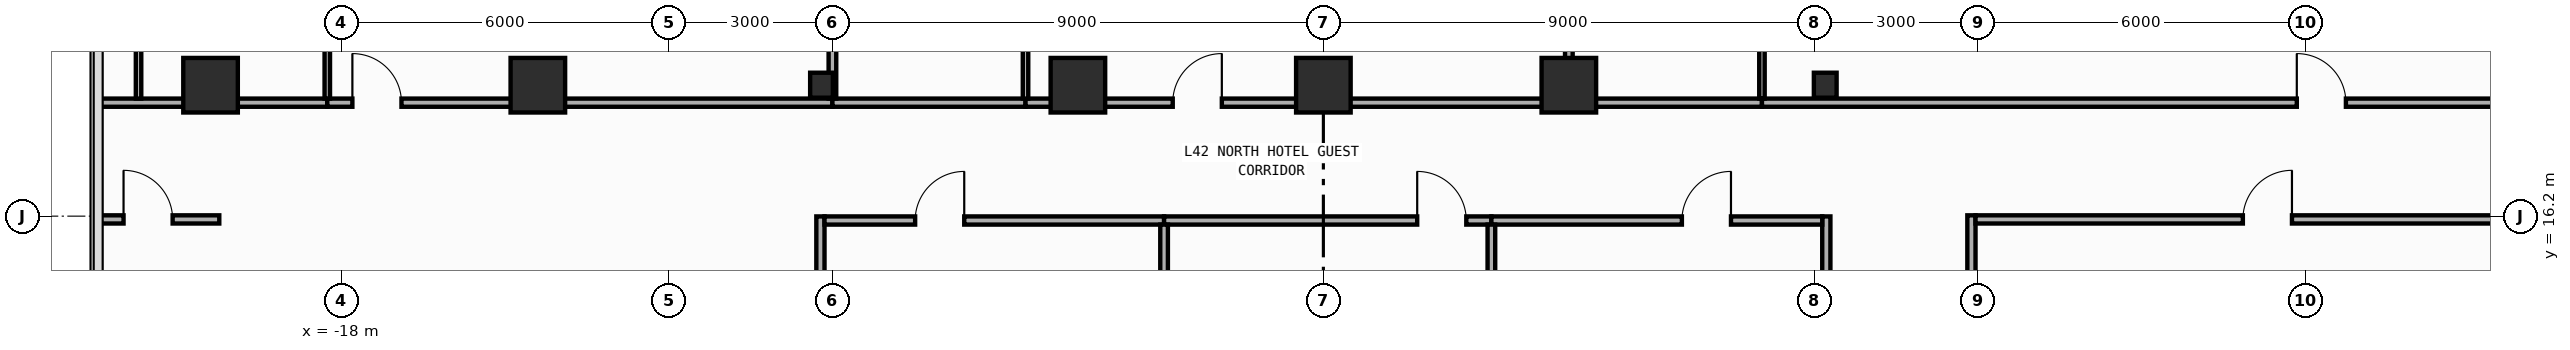
"""IFC4 building model, lengths in metres.
Left out: names, types, materials, properties, quantities, classifications, styles, units other than length and angle.
Written with IfcOpenShell. Run it as: python <this file> out.ifc"""

import sys

from ifc_helpers import new_model, si_unit, direction, frame, frame_2d, origin, origin_2d, place, context, subcontext, project, spatial, rectangle, i_section, extrude, element, fill, save


model = new_model("IFC4")
c1 = context("Model", 3, precision=1e-05, world=origin(), true_north=direction((0.0, 1.0)))
c2 = subcontext(c1, "Body", "Model", "MODEL_VIEW")
j1 = project(units=[si_unit("LENGTHUNIT", "METRE"), si_unit("PLANEANGLEUNIT", "RADIAN")], contexts=[c1])
p1 = place(None, origin())
s1 = spatial("IfcSite", under=j1, at=p1, CompositionType="ELEMENT")
p2 = place(p1, origin())
s2 = spatial("IfcBuilding", under=s1, at=p2, CompositionType="ELEMENT")
p3 = place(p2, frame((0.0, 0.0, 184.0)))
s3 = spatial("IfcBuildingStorey", under=s2, at=p3, CompositionType="ELEMENT", Elevation=184.0)
for number, where, z_axis, x_axis in (
    (1, (-9.2, 18.6, 0.0), (0.0, 0.0, 1.0), (1.0, 0.0, 0.0)),
    (2, (9.2, 18.6, 0.0), (0.0, 0.0, 1.0), (1.0, 0.0, 0.0)),
):
    element("IfcColumn", number, at=place(p3, frame(where, z_axis=z_axis, x_axis=x_axis)), inside=s3, PredefinedType="COLUMN", context=c2, shape_type="SweptSolid", body=[
        extrude(i_section(OverallWidth=0.417, OverallDepth=0.458, WebThickness=0.03, FlangeThickness=0.05, FilletRadius=0.022, at=origin_2d()), origin(), (0.0, 0.0, 1.0), 3.8),
    ])
for number, where, z_axis, x_axis in (
    (3, (-20.4, 18.6, 0.0), (0.0, 0.0, 1.0), (1.0, 0.0, 0.0)),
    (4, (-14.4, 18.6, 0.0), (0.0, 0.0, 1.0), (1.0, 0.0, 0.0)),
    (5, (-4.5, 18.6, 0.0), (0.0, 0.0, 1.0), (1.0, 0.0, 0.0)),
    (6, (0.0, 18.6, 0.0), (0.0, 0.0, 1.0), (1.0, 0.0, 0.0)),
    (7, (4.5, 18.6, 0.0), (0.0, 0.0, 1.0), (1.0, 0.0, 0.0)),
):
    element("IfcColumn", number, at=place(p3, frame(where, z_axis=z_axis, x_axis=x_axis)), inside=s3, PredefinedType="COLUMN", context=c2, shape_type="SweptSolid", body=[
        extrude(rectangle(XDim=1.0, YDim=1.0, at=origin_2d()), origin(), (0.0, 0.0, 1.0), 3.8),
    ])
p4 = place(p3, frame((-9.22, -5.8, 0.0), z_axis=(0.0, 0.0, 1.0), x_axis=(0.0, 1.0, 0.0)))
e8 = element("IfcWall", 8, at=p4, inside=s3, PredefinedType="PARTITIONING", context=c2, shape_type="SweptSolid", body=[
    extrude(rectangle(XDim=21.995, YDim=0.15, at=frame_2d((10.998, 0.0))), origin(), (0.0, 0.0, 1.0), 2.952),
])
p5 = place(p4, frame((10.749, 0.0, 0.0)))
e9 = element("IfcOpeningElement", 9, at=p5, cuts=e8, PredefinedType="OPENING", context=c2, shape_type="SweptSolid", body=[
    extrude(rectangle(XDim=0.9, YDim=2.15, at=frame_2d((0.45, 1.075))), frame((0.0, 0.085, 0.0), z_axis=(0.0, -1.0, 0.0), x_axis=(1.0, 0.0, 0.0)), (0.0, 0.0, 1.0), 0.17),
])
p6 = place(p3, frame((9.22, -5.8, 0.0), z_axis=(0.0, 0.0, 1.0), x_axis=(0.0, 1.0, 0.0)))
e10 = element("IfcWall", 10, at=p6, inside=s3, PredefinedType="PARTITIONING", context=c2, shape_type="SweptSolid", body=[
    extrude(rectangle(XDim=21.995, YDim=0.15, at=frame_2d((10.998, 0.0))), origin(), (0.0, 0.0, 1.0), 2.952),
])
p7 = place(p6, frame((10.749, 0.0, 0.0)))
e11 = element("IfcOpeningElement", 11, at=p7, cuts=e10, PredefinedType="OPENING", context=c2, shape_type="SweptSolid", body=[
    extrude(rectangle(XDim=0.9, YDim=2.15, at=frame_2d((0.45, 1.075))), frame((0.0, 0.085, 0.0), z_axis=(0.0, -1.0, 0.0), x_axis=(1.0, 0.0, 0.0)), (0.0, 0.0, 1.0), 0.17),
])
p8 = place(p3, frame((11.88, 7.16, 0.0), z_axis=(0.0, 0.0, 1.0), x_axis=(0.0, 1.0, 0.0)))
e12 = element("IfcWall", 12, at=p8, inside=s3, PredefinedType="PARTITIONING", context=c2, shape_type="SweptSolid", body=[
    extrude(rectangle(XDim=9.055, YDim=0.15, at=frame_2d((4.528, 0.0))), origin(), (0.0, 0.0, 1.0), 3.54),
])
p9 = place(p8, frame((0.46, 0.0, 0.0)))
e13 = element("IfcOpeningElement", 13, at=p9, cuts=e12, PredefinedType="OPENING", context=c2, shape_type="SweptSolid", body=[
    extrude(rectangle(XDim=0.9, YDim=2.15, at=frame_2d((0.45, 1.075))), frame((0.0, 0.085, 0.0), z_axis=(0.0, -1.0, 0.0), x_axis=(1.0, 0.0, 0.0)), (0.0, 0.0, 1.0), 0.17),
])
p10 = place(p3, frame((-9.145, 16.12, 0.0), z_axis=(0.0, 0.0, 1.0), x_axis=(1.0, 0.0, 0.0)))
e14 = element("IfcWall", 14, at=p10, inside=s3, PredefinedType="PARTITIONING", context=c2, shape_type="SweptSolid", body=[
    extrude(rectangle(XDim=6.225, YDim=0.15, at=frame_2d((3.113, 0.0))), origin(), (0.0, 0.0, 1.0), 3.54),
])
p11 = place(p10, frame((1.661, 0.0, 0.0)))
e15 = element("IfcOpeningElement", 15, at=p11, cuts=e14, PredefinedType="OPENING", context=c2, shape_type="SweptSolid", body=[
    extrude(rectangle(XDim=0.9, YDim=2.15, at=frame_2d((0.45, 1.075))), frame((0.0, 0.085, 0.0), z_axis=(0.0, -1.0, 0.0), x_axis=(1.0, 0.0, 0.0)), (0.0, 0.0, 1.0), 0.17),
])
p12 = place(p3, frame((-2.92, 16.12, 0.0), z_axis=(0.0, 0.0, 1.0), x_axis=(1.0, 0.0, 0.0)))
e16 = element("IfcWall", 16, at=p12, inside=s3, PredefinedType="PARTITIONING", context=c2, shape_type="SweptSolid", body=[
    extrude(rectangle(XDim=6.0, YDim=0.15, at=frame_2d((3.0, 0.0))), origin(), (0.0, 0.0, 1.0), 3.54),
])
p13 = place(p12, frame((4.64, 0.0, 0.0)))
e17 = element("IfcOpeningElement", 17, at=p13, cuts=e16, PredefinedType="OPENING", context=c2, shape_type="SweptSolid", body=[
    extrude(rectangle(XDim=0.9, YDim=2.15, at=frame_2d((0.45, 1.075))), frame((0.0, 0.085, 0.0), z_axis=(0.0, -1.0, 0.0), x_axis=(1.0, 0.0, 0.0)), (0.0, 0.0, 1.0), 0.17),
])
p14 = place(p3, frame((3.08, 16.12, 0.0), z_axis=(0.0, 0.0, 1.0), x_axis=(1.0, 0.0, 0.0)))
e18 = element("IfcWall", 18, at=p14, inside=s3, PredefinedType="PARTITIONING", context=c2, shape_type="SweptSolid", body=[
    extrude(rectangle(XDim=6.065, YDim=0.15, at=frame_2d((3.032, 0.0))), origin(), (0.0, 0.0, 1.0), 3.54),
])
p15 = place(p14, frame((3.492, 0.0, 0.0)))
e19 = element("IfcOpeningElement", 19, at=p15, cuts=e18, PredefinedType="OPENING", context=c2, shape_type="SweptSolid", body=[
    extrude(rectangle(XDim=0.9, YDim=2.15, at=frame_2d((0.45, 1.075))), frame((0.0, 0.085, 0.0), z_axis=(0.0, -1.0, 0.0), x_axis=(1.0, 0.0, 0.0)), (0.0, 0.0, 1.0), 0.17),
])
p16 = place(p3, frame((-22.455, 18.28, 0.0), z_axis=(0.0, 0.0, 1.0), x_axis=(1.0, 0.0, 0.0)))
e20 = element("IfcWall", 20, at=p16, inside=s3, PredefinedType="PARTITIONING", context=c2, shape_type="SweptSolid", body=[
    extrude(rectangle(XDim=4.195, YDim=0.15, at=frame_2d((2.098, 0.0))), origin(), (0.0, 0.0, 1.0), 2.952),
])
p17 = place(p3, frame((-18.26, 18.28, 0.0), z_axis=(0.0, 0.0, 1.0), x_axis=(1.0, 0.0, 0.0)))
e21 = element("IfcWall", 21, at=p17, inside=s3, PredefinedType="PARTITIONING", context=c2, shape_type="SweptSolid", body=[
    extrude(rectangle(XDim=9.26, YDim=0.15, at=frame_2d((4.63, 0.0))), origin(), (0.0, 0.0, 1.0), 2.952),
])
p18 = place(p17, frame((0.46, 0.0, 0.0)))
e22 = element("IfcOpeningElement", 22, at=p18, cuts=e21, PredefinedType="OPENING", context=c2, shape_type="SweptSolid", body=[
    extrude(rectangle(XDim=0.9, YDim=2.15, at=frame_2d((0.45, 1.075))), frame((0.0, 0.085, 0.0), z_axis=(0.0, -1.0, 0.0), x_axis=(1.0, 0.0, 0.0)), (0.0, 0.0, 1.0), 0.17),
])
p19 = place(p3, frame((-9.0, 18.28, 0.0), z_axis=(0.0, 0.0, 1.0), x_axis=(1.0, 0.0, 0.0)))
e23 = element("IfcWall", 23, at=p19, inside=s3, PredefinedType="PARTITIONING", context=c2, shape_type="SweptSolid", body=[
    extrude(rectangle(XDim=3.54, YDim=0.15, at=frame_2d((1.77, 0.0))), origin(), (0.0, 0.0, 1.0), 2.952),
])
p20 = place(p3, frame((-5.46, 18.28, 0.0), z_axis=(0.0, 0.0, 1.0), x_axis=(1.0, 0.0, 0.0)))
e24 = element("IfcWall", 24, at=p20, inside=s3, PredefinedType="PARTITIONING", context=c2, shape_type="SweptSolid", body=[
    extrude(rectangle(XDim=9.96, YDim=0.15, at=frame_2d((4.98, 0.0))), origin(), (0.0, 0.0, 1.0), 2.952),
])
p21 = place(p20, frame((2.698, 0.0, 0.0)))
e25 = element("IfcOpeningElement", 25, at=p21, cuts=e24, PredefinedType="OPENING", context=c2, shape_type="SweptSolid", body=[
    extrude(rectangle(XDim=0.9, YDim=2.15, at=frame_2d((0.45, 1.075))), frame((0.0, 0.085, 0.0), z_axis=(0.0, -1.0, 0.0), x_axis=(1.0, 0.0, 0.0)), (0.0, 0.0, 1.0), 0.17),
])
p22 = place(p3, frame((4.5, 18.28, 0.0), z_axis=(0.0, 0.0, 1.0), x_axis=(1.0, 0.0, 0.0)))
e26 = element("IfcWall", 26, at=p22, inside=s3, PredefinedType="PARTITIONING", context=c2, shape_type="SweptSolid", body=[
    extrude(rectangle(XDim=3.54, YDim=0.15, at=frame_2d((1.77, 0.0))), origin(), (0.0, 0.0, 1.0), 2.952),
])
p23 = place(p3, frame((8.04, 18.28, 0.0), z_axis=(0.0, 0.0, 1.0), x_axis=(1.0, 0.0, 0.0)))
e27 = element("IfcWall", 27, at=p23, inside=s3, PredefinedType="PARTITIONING", context=c2, shape_type="SweptSolid", body=[
    extrude(rectangle(XDim=14.415, YDim=0.15, at=frame_2d((7.208, 0.0))), origin(), (0.0, 0.0, 1.0), 2.952),
])
p24 = place(p23, frame((9.805, 0.0, 0.0)))
e28 = element("IfcOpeningElement", 28, at=p24, cuts=e27, PredefinedType="OPENING", context=c2, shape_type="SweptSolid", body=[
    extrude(rectangle(XDim=0.9, YDim=2.15, at=frame_2d((0.45, 1.075))), frame((0.0, 0.085, 0.0), z_axis=(0.0, -1.0, 0.0), x_axis=(1.0, 0.0, 0.0)), (0.0, 0.0, 1.0), 0.17),
])
p25 = place(p3, frame((11.955, 16.14, 0.0), z_axis=(0.0, 0.0, 1.0), x_axis=(1.0, 0.0, 0.0)))
e29 = element("IfcWall", 29, at=p25, inside=s3, PredefinedType="PARTITIONING", context=c2, shape_type="SweptSolid", body=[
    extrude(rectangle(XDim=10.5, YDim=0.15, at=frame_2d((5.25, 0.0))), origin(), (0.0, 0.0, 1.0), 3.54),
])
p26 = place(p25, frame((4.901, 0.0, 0.0)))
e30 = element("IfcOpeningElement", 30, at=p26, cuts=e29, PredefinedType="OPENING", context=c2, shape_type="SweptSolid", body=[
    extrude(rectangle(XDim=0.9, YDim=2.15, at=frame_2d((0.45, 1.075))), frame((0.0, 0.085, 0.0), z_axis=(0.0, -1.0, 0.0), x_axis=(1.0, 0.0, 0.0)), (0.0, 0.0, 1.0), 0.17),
])
p27 = place(p3, frame((-22.455, 16.14, 0.0), z_axis=(0.0, 0.0, 1.0), x_axis=(1.0, 0.0, 0.0)))
e31 = element("IfcWall", 31, at=p27, inside=s3, PredefinedType="PARTITIONING", context=c2, shape_type="SweptSolid", body=[
    extrude(rectangle(XDim=2.215, YDim=0.15, at=frame_2d((1.107, 0.0))), origin(), (0.0, 0.0, 1.0), 3.54),
])
p28 = place(p27, frame((0.46, 0.0, 0.0)))
e32 = element("IfcOpeningElement", 32, at=p28, cuts=e31, PredefinedType="OPENING", context=c2, shape_type="SweptSolid", body=[
    extrude(rectangle(XDim=0.9, YDim=2.15, at=frame_2d((0.45, 1.075))), frame((0.0, 0.085, 0.0), z_axis=(0.0, -1.0, 0.0), x_axis=(1.0, 0.0, 0.0)), (0.0, 0.0, 1.0), 0.17),
])
for number, where, z_axis, x_axis in (
    (33, (-2.92, -5.73, 0.0), (0.0, 0.0, 1.0), (0.0, 1.0, 0.0)),
    (34, (3.08, -5.73, 0.0), (0.0, 0.0, 1.0), (0.0, 1.0, 0.0)),
):
    element("IfcWall", number, at=place(p3, frame(where, z_axis=z_axis, x_axis=x_axis)), inside=s3, PredefinedType="PARTITIONING", context=c2, shape_type="SweptSolid", body=[
        extrude(rectangle(XDim=21.775, YDim=0.14, at=frame_2d((10.887, 0.0))), origin(), (0.0, 0.0, 1.0), 3.54),
    ])
p29 = place(p3, frame((-18.26, 18.355, 0.0), z_axis=(0.0, 0.0, 1.0), x_axis=(0.0, 1.0, 0.0)))
e35 = element("IfcWall", 35, at=p29, inside=s3, PredefinedType="PARTITIONING", context=c2, shape_type="SweptSolid", body=[
    extrude(rectangle(XDim=2.965, YDim=0.1, at=frame_2d((1.482, 0.0))), origin(), (0.0, 0.0, 1.0), 3.54),
])
p30 = place(p29, frame((1.705, 0.0, 0.0)))
e36 = element("IfcOpeningElement", 36, at=p30, cuts=e35, PredefinedType="OPENING", context=c2, shape_type="SweptSolid", body=[
    extrude(rectangle(XDim=0.8, YDim=2.1, at=frame_2d((0.4, 1.05))), frame((0.0, 0.06, 0.0), z_axis=(0.0, -1.0, 0.0), x_axis=(1.0, 0.0, 0.0)), (0.0, 0.0, 1.0), 0.12),
])
p31 = place(p3, frame((-9.0, 18.355, 0.0), z_axis=(0.0, 0.0, 1.0), x_axis=(0.0, 1.0, 0.0)))
e37 = element("IfcWall", 37, at=p31, inside=s3, PredefinedType="PARTITIONING", context=c2, shape_type="SweptSolid", body=[
    extrude(rectangle(XDim=3.015, YDim=0.14, at=frame_2d((1.508, 0.0))), origin(), (0.0, 0.0, 1.0), 2.952),
])
p32 = place(p3, frame((-5.46, 18.355, 0.0), z_axis=(0.0, 0.0, 1.0), x_axis=(0.0, 1.0, 0.0)))
e38 = element("IfcWall", 38, at=p32, inside=s3, PredefinedType="PARTITIONING", context=c2, shape_type="SweptSolid", body=[
    extrude(rectangle(XDim=2.965, YDim=0.1, at=frame_2d((1.482, 0.0))), origin(), (0.0, 0.0, 1.0), 3.54),
])
p33 = place(p32, frame((1.705, 0.0, 0.0)))
e39 = element("IfcOpeningElement", 39, at=p33, cuts=e38, PredefinedType="OPENING", context=c2, shape_type="SweptSolid", body=[
    extrude(rectangle(XDim=0.8, YDim=2.1, at=frame_2d((0.4, 1.05))), frame((0.0, 0.06, 0.0), z_axis=(0.0, -1.0, 0.0), x_axis=(1.0, 0.0, 0.0)), (0.0, 0.0, 1.0), 0.12),
])
p34 = place(p3, frame((4.5, 18.355, 0.0), z_axis=(0.0, 0.0, 1.0), x_axis=(0.0, 1.0, 0.0)))
e40 = element("IfcWall", 40, at=p34, inside=s3, PredefinedType="PARTITIONING", context=c2, shape_type="SweptSolid", body=[
    extrude(rectangle(XDim=3.015, YDim=0.14, at=frame_2d((1.508, 0.0))), origin(), (0.0, 0.0, 1.0), 3.54),
])
p35 = place(p3, frame((8.04, 18.355, 0.0), z_axis=(0.0, 0.0, 1.0), x_axis=(0.0, 1.0, 0.0)))
e41 = element("IfcWall", 41, at=p35, inside=s3, PredefinedType="PARTITIONING", context=c2, shape_type="SweptSolid", body=[
    extrude(rectangle(XDim=2.965, YDim=0.1, at=frame_2d((1.482, 0.0))), origin(), (0.0, 0.0, 1.0), 3.54),
])
p36 = place(p35, frame((1.705, 0.0, 0.0)))
e42 = element("IfcOpeningElement", 42, at=p36, cuts=e41, PredefinedType="OPENING", context=c2, shape_type="SweptSolid", body=[
    extrude(rectangle(XDim=0.8, YDim=2.1, at=frame_2d((0.4, 1.05))), frame((0.0, 0.06, 0.0), z_axis=(0.0, -1.0, 0.0), x_axis=(1.0, 0.0, 0.0)), (0.0, 0.0, 1.0), 0.12),
])
p37 = place(p3, frame((-21.72, 18.355, 0.0), z_axis=(0.0, 0.0, 1.0), x_axis=(0.0, 1.0, 0.0)))
e43 = element("IfcWall", 43, at=p37, inside=s3, PredefinedType="PARTITIONING", context=c2, shape_type="SweptSolid", body=[
    extrude(rectangle(XDim=2.965, YDim=0.1, at=frame_2d((1.482, 0.0))), origin(), (0.0, 0.0, 1.0), 3.54),
])
p38 = place(p11, origin())
e44 = element("IfcDoor", 44, at=p38, inside=s3, OperationType="SINGLE_SWING_RIGHT", PredefinedType="DOOR", context=c2, shape_type="SweptSolid", body=[
    extrude(rectangle(XDim=0.9, YDim=2.15, at=frame_2d((0.45, 1.075))), frame((0.0, 0.025, 0.0), z_axis=(0.0, -1.0, 0.0), x_axis=(1.0, 0.0, 0.0)), (0.0, 0.0, 1.0), 0.05),
])
fill(e15, e44)
p39 = place(p13, origin())
e45 = element("IfcDoor", 45, at=p39, inside=s3, OperationType="SINGLE_SWING_LEFT", PredefinedType="DOOR", context=c2, shape_type="SweptSolid", body=[
    extrude(rectangle(XDim=0.9, YDim=2.15, at=frame_2d((0.45, 1.075))), frame((0.0, 0.025, 0.0), z_axis=(0.0, -1.0, 0.0), x_axis=(1.0, 0.0, 0.0)), (0.0, 0.0, 1.0), 0.05),
])
fill(e17, e45)
p40 = place(p15, origin())
e46 = element("IfcDoor", 46, at=p40, inside=s3, OperationType="SINGLE_SWING_RIGHT", PredefinedType="DOOR", context=c2, shape_type="SweptSolid", body=[
    extrude(rectangle(XDim=0.9, YDim=2.15, at=frame_2d((0.45, 1.075))), frame((0.0, 0.025, 0.0), z_axis=(0.0, -1.0, 0.0), x_axis=(1.0, 0.0, 0.0)), (0.0, 0.0, 1.0), 0.05),
])
fill(e19, e46)
p41 = place(p18, origin())
e47 = element("IfcDoor", 47, at=p41, inside=s3, OperationType="SINGLE_SWING_LEFT", PredefinedType="DOOR", context=c2, shape_type="SweptSolid", body=[
    extrude(rectangle(XDim=0.9, YDim=2.15, at=frame_2d((0.45, 1.075))), frame((0.0, 0.025, 0.0), z_axis=(0.0, -1.0, 0.0), x_axis=(1.0, 0.0, 0.0)), (0.0, 0.0, 1.0), 0.05),
])
fill(e22, e47)
p42 = place(p21, origin())
e48 = element("IfcDoor", 48, at=p42, inside=s3, OperationType="SINGLE_SWING_RIGHT", PredefinedType="DOOR", context=c2, shape_type="SweptSolid", body=[
    extrude(rectangle(XDim=0.9, YDim=2.15, at=frame_2d((0.45, 1.075))), frame((0.0, 0.025, 0.0), z_axis=(0.0, -1.0, 0.0), x_axis=(1.0, 0.0, 0.0)), (0.0, 0.0, 1.0), 0.05),
])
fill(e25, e48)
p43 = place(p24, origin())
e49 = element("IfcDoor", 49, at=p43, inside=s3, OperationType="SINGLE_SWING_LEFT", PredefinedType="DOOR", context=c2, shape_type="SweptSolid", body=[
    extrude(rectangle(XDim=0.9, YDim=2.15, at=frame_2d((0.45, 1.075))), frame((0.0, 0.025, 0.0), z_axis=(0.0, -1.0, 0.0), x_axis=(1.0, 0.0, 0.0)), (0.0, 0.0, 1.0), 0.05),
])
fill(e28, e49)
p44 = place(p26, origin())
e50 = element("IfcDoor", 50, at=p44, inside=s3, OperationType="SINGLE_SWING_RIGHT", PredefinedType="DOOR", context=c2, shape_type="SweptSolid", body=[
    extrude(rectangle(XDim=0.9, YDim=2.15, at=frame_2d((0.45, 1.075))), frame((0.0, 0.025, 0.0), z_axis=(0.0, -1.0, 0.0), x_axis=(1.0, 0.0, 0.0)), (0.0, 0.0, 1.0), 0.05),
])
fill(e30, e50)
p45 = place(p28, origin())
e51 = element("IfcDoor", 51, at=p45, inside=s3, OperationType="SINGLE_SWING_LEFT", PredefinedType="DOOR", context=c2, shape_type="SweptSolid", body=[
    extrude(rectangle(XDim=0.9, YDim=2.15, at=frame_2d((0.45, 1.075))), frame((0.0, 0.025, 0.0), z_axis=(0.0, -1.0, 0.0), x_axis=(1.0, 0.0, 0.0)), (0.0, 0.0, 1.0), 0.05),
])
fill(e32, e51)
save(model, sys.argv[1])
